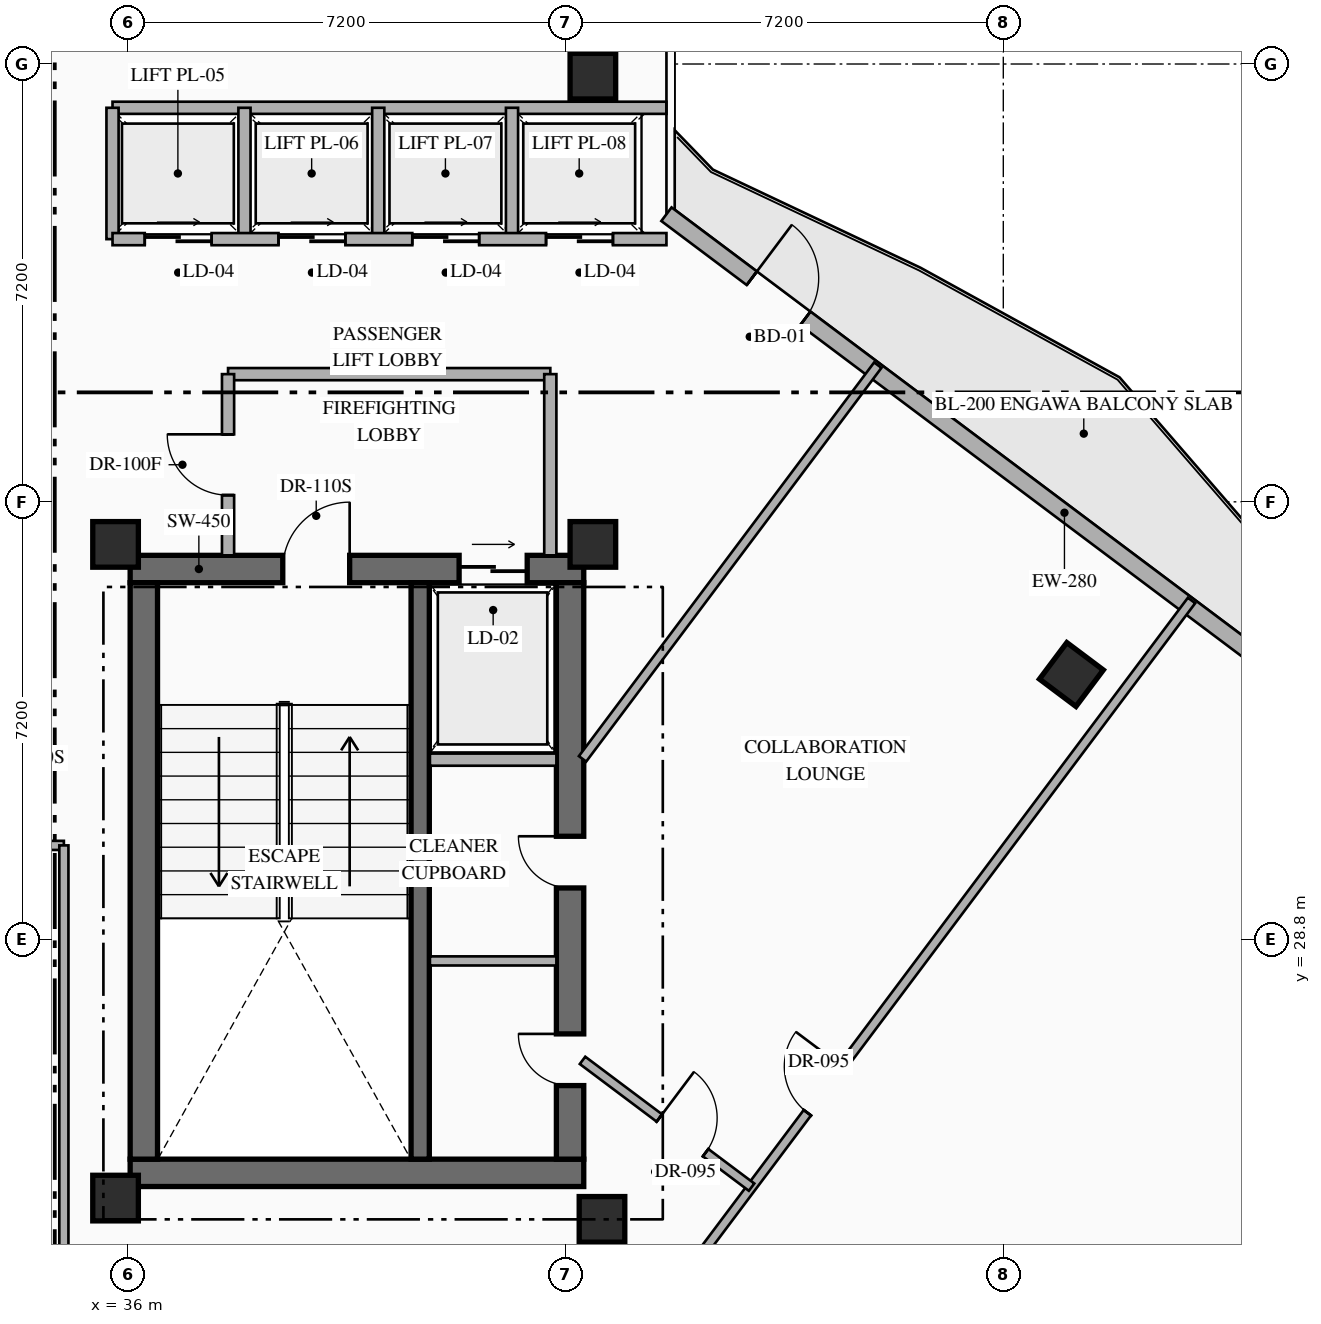
"""IFC4 building model, lengths in metres.
Left out: names, types, materials, properties, quantities, classifications, styles, units other than length and angle.
Written with IfcOpenShell. Run it as: python <this file> out.ifc"""

import sys

from ifc_helpers import new_model, si_unit, direction, frame, frame_2d, origin, origin_2d, place, context, subcontext, project, spatial, rectangle, hollow_rectangle, extrude, element, fill, save


model = new_model("IFC4")
c1 = context("Model", 3, precision=1e-05, world=origin(), true_north=direction((0.0, 1.0)))
c2 = subcontext(c1, "Body", "Model", "MODEL_VIEW")
j1 = project(units=[si_unit("LENGTHUNIT", "METRE"), si_unit("PLANEANGLEUNIT", "RADIAN")], contexts=[c1])
p1 = place(None, origin())
s1 = spatial("IfcSite", under=j1, at=p1, CompositionType="ELEMENT")
p2 = place(p1, origin())
s2 = spatial("IfcBuilding", under=s1, at=p2, CompositionType="ELEMENT")
p3 = place(p2, frame((0.0, 0.0, 191.55)))
s3 = spatial("IfcBuildingStorey", under=s2, at=p3, CompositionType="ELEMENT", Elevation=191.55)
p4 = place(p3, frame((36.04, 24.965, 0.0), z_axis=(0.0, 0.0, 1.0), x_axis=(1.0, 0.0, 0.0)))
e1 = element("IfcWall", 1, at=p4, inside=s3, PredefinedType="SHEAR", context=c2, shape_type="SweptSolid", body=[
    extrude(rectangle(XDim=7.46, YDim=0.45, at=frame_2d((3.73, 0.0))), origin(), (0.0, 0.0, 1.0), 3.6),
])
p5 = place(p3, frame((36.04, 34.895, 0.0), z_axis=(0.0, 0.0, 1.0), x_axis=(1.0, 0.0, 0.0)))
e2 = element("IfcWall", 2, at=p5, inside=s3, PredefinedType="SHEAR", context=c2, shape_type="SweptSolid", body=[
    extrude(rectangle(XDim=7.46, YDim=0.45, at=frame_2d((3.73, 0.0))), origin(), (0.0, 0.0, 1.0), 3.6),
])
p6 = place(p5, frame((2.51, 0.0, 0.0)))
e3 = element("IfcOpeningElement", 3, at=p6, cuts=e2, PredefinedType="OPENING", context=c2, shape_type="SweptSolid", body=[
    extrude(rectangle(XDim=1.1, YDim=2.2, at=frame_2d((0.55, 1.1))), frame((0.0, 0.235, 0.0), z_axis=(0.0, -1.0, 0.0), x_axis=(1.0, 0.0, 0.0)), (0.0, 0.0, 1.0), 0.47),
])
p7 = place(p5, frame((5.41, 0.0, 0.0)))
e4 = element("IfcOpeningElement", 4, at=p7, cuts=e2, PredefinedType="OPENING", context=c2, shape_type="SweptSolid", body=[
    extrude(rectangle(XDim=1.12, YDim=2.15, at=frame_2d((0.56, 1.075))), frame((0.0, 0.235, 0.0), z_axis=(0.0, -1.0, 0.0), x_axis=(1.0, 0.0, 0.0)), (0.0, 0.0, 1.0), 0.47),
])
p8 = place(p3, frame((36.265, 25.19, 0.0), z_axis=(0.0, 0.0, 1.0), x_axis=(0.0, 1.0, 0.0)))
e5 = element("IfcWall", 5, at=p8, inside=s3, PredefinedType="SHEAR", context=c2, shape_type="SweptSolid", body=[
    extrude(rectangle(XDim=9.48, YDim=0.45, at=frame_2d((4.74, 0.0))), origin(), (0.0, 0.0, 1.0), 3.6),
])
p9 = place(p3, frame((43.275, 25.19, 0.0), z_axis=(0.0, 0.0, 1.0), x_axis=(0.0, 1.0, 0.0)))
e6 = element("IfcWall", 6, at=p9, inside=s3, PredefinedType="SHEAR", context=c2, shape_type="SweptSolid", body=[
    extrude(rectangle(XDim=9.48, YDim=0.45, at=frame_2d((4.74, 0.0))), origin(), (0.0, 0.0, 1.0), 3.6),
])
p10 = place(p9, frame((1.21, 0.0, 0.0)))
e7 = element("IfcOpeningElement", 7, at=p10, cuts=e6, PredefinedType="OPENING", context=c2, shape_type="SweptSolid", body=[
    extrude(rectangle(XDim=0.85, YDim=2.08, at=frame_2d((0.425, 1.04))), frame((0.0, 0.235, 0.0), z_axis=(0.0, -1.0, 0.0), x_axis=(1.0, 0.0, 0.0)), (0.0, 0.0, 1.0), 0.47),
])
p11 = place(p9, frame((4.46, 0.0, 0.0)))
e8 = element("IfcOpeningElement", 8, at=p11, cuts=e6, PredefinedType="OPENING", context=c2, shape_type="SweptSolid", body=[
    extrude(rectangle(XDim=0.85, YDim=2.08, at=frame_2d((0.425, 1.04))), frame((0.0, 0.235, 0.0), z_axis=(0.0, -1.0, 0.0), x_axis=(1.0, 0.0, 0.0)), (0.0, 0.0, 1.0), 0.47),
])
p12 = place(p3, frame((40.81, 25.19, 0.0), z_axis=(0.0, 0.0, 1.0), x_axis=(0.0, 1.0, 0.0)))
e9 = element("IfcWall", 9, at=p12, inside=s3, PredefinedType="SHEAR", context=c2, shape_type="SweptSolid", body=[
    extrude(rectangle(XDim=9.48, YDim=0.3, at=frame_2d((4.74, 0.0))), origin(), (0.0, 0.0, 1.0), 3.6),
])
for number, where, z_axis, x_axis in (
    (10, (35.8, 24.55, 0.0), (0.0, 0.0, 1.0), (1.0, 0.0, 0.0)),
    (11, (43.8, 24.2, 0.0), (0.0, 0.0, 1.0), (1.0, 0.0, 0.0)),
    (12, (35.8, 35.3, 0.0), (0.0, 0.0, 1.0), (1.0, 0.0, 0.0)),
    (13, (43.65, 35.3, 0.0), (0.0, 0.0, 1.0), (1.0, 0.0, 0.0)),
    (14, (43.65, 43.0, 0.0), (0.0, 0.0, 1.0), (1.0, 0.0, 0.0)),
    (15, (51.52, 33.16, 0.0), (0.0, 0.0, 1.0), (0.8, -0.6, 0.0)),
):
    element("IfcColumn", number, at=place(p3, frame(where, z_axis=z_axis, x_axis=x_axis)), inside=s3, PredefinedType="COLUMN", context=c2, shape_type="SweptSolid", body=[
        extrude(hollow_rectangle(XDim=0.75, YDim=0.75, WallThickness=0.028, at=origin_2d()), origin(), (0.0, 0.0, 1.0), 3.6),
    ])
p13 = place(p3, frame((44.86, 40.73, 0.0), z_axis=(0.0, 0.0, 1.0), x_axis=(0.800007624502, -0.599989833863, 0.0)))
e16 = element("IfcWall", 16, at=p13, inside=s3, PredefinedType="STANDARD", context=c2, shape_type="SweptSolid", body=[
    extrude(rectangle(XDim=19.212, YDim=0.28, at=frame_2d((9.606, 0.0))), origin(), (0.0, 0.0, 1.0), 3.35),
])
p14 = place(p13, frame((1.755, 0.0, 0.0)))
e17 = element("IfcOpeningElement", 17, at=p14, cuts=e16, PredefinedType="OPENING", context=c2, shape_type="SweptSolid", body=[
    extrude(rectangle(XDim=1.1, YDim=2.2, at=frame_2d((0.55, 1.1))), frame((0.0, 0.15, 0.0), z_axis=(0.0, -1.0, 0.0), x_axis=(1.0, 0.0, 0.0)), (0.0, 0.0, 1.0), 0.3),
])
p15 = place(p13, frame((13.509, 0.0, 0.85)))
e18 = element("IfcOpeningElement", 18, at=p15, cuts=e16, PredefinedType="OPENING", context=c2, shape_type="SweptSolid", body=[
    extrude(rectangle(XDim=1.8, YDim=2.1, at=frame_2d((0.9, 1.05))), frame((0.0, 0.15, 0.0), z_axis=(0.0, -1.0, 0.0), x_axis=(1.0, 0.0, 0.0)), (0.0, 0.0, 1.0), 0.3),
])
p16 = place(p3, frame((40.97, 31.76, 0.0), z_axis=(0.0, 0.0, 1.0), x_axis=(1.0, 0.0, 0.0)))
e19 = element("IfcWall", 19, at=p16, inside=s3, PredefinedType="STANDARD", context=c2, shape_type="SweptSolid", body=[
    extrude(rectangle(XDim=2.08, YDim=0.2, at=frame_2d((1.04, 0.0))), origin(), (0.0, 0.0, 1.0), 3.35),
])
p17 = place(p3, frame((40.97, 28.45, 0.0), z_axis=(0.0, 0.0, 1.0), x_axis=(1.0, 0.0, 0.0)))
e20 = element("IfcWall", 20, at=p17, inside=s3, PredefinedType="PARTITIONING", context=c2, shape_type="SweptSolid", body=[
    extrude(rectangle(XDim=2.08, YDim=0.15, at=frame_2d((1.04, 0.0))), origin(), (0.0, 0.0, 1.0), 3.35),
])
p18 = place(p3, frame((37.65, 38.1, 0.0), z_axis=(0.0, 0.0, 1.0), x_axis=(1.0, 0.0, 0.0)))
e21 = element("IfcWall", 21, at=p18, inside=s3, PredefinedType="STANDARD", context=c2, shape_type="SweptSolid", body=[
    extrude(rectangle(XDim=5.3, YDim=0.2, at=frame_2d((2.65, 0.0))), origin(), (0.0, 0.0, 1.0), 3.35),
])
p19 = place(p3, frame((42.95, 35.12, 0.0), z_axis=(0.0, 0.0, 1.0), x_axis=(0.0, 1.0, 0.0)))
e22 = element("IfcWall", 22, at=p19, inside=s3, PredefinedType="STANDARD", context=c2, shape_type="SweptSolid", body=[
    extrude(rectangle(XDim=2.98, YDim=0.2, at=frame_2d((1.49, 0.0))), origin(), (0.0, 0.0, 1.0), 3.35),
])
p20 = place(p3, frame((37.65, 35.12, 0.0), z_axis=(0.0, 0.0, 1.0), x_axis=(0.0, 1.0, 0.0)))
e23 = element("IfcWall", 23, at=p20, inside=s3, PredefinedType="STANDARD", context=c2, shape_type="SweptSolid", body=[
    extrude(rectangle(XDim=2.98, YDim=0.2, at=frame_2d((1.49, 0.0))), origin(), (0.0, 0.0, 1.0), 3.35),
])
p21 = place(p20, frame((0.99, 0.0, 0.0)))
e24 = element("IfcOpeningElement", 24, at=p21, cuts=e23, PredefinedType="OPENING", context=c2, shape_type="SweptSolid", body=[
    extrude(rectangle(XDim=1.0, YDim=2.2, at=frame_2d((0.5, 1.1))), frame((0.0, 0.11, 0.0), z_axis=(0.0, -1.0, 0.0), x_axis=(1.0, 0.0, 0.0)), (0.0, 0.0, 1.0), 0.22),
])
p22 = place(p3, frame((35.75, 42.48, 0.0), z_axis=(0.0, 0.0, 1.0), x_axis=(1.0, 0.0, 0.0)))
e25 = element("IfcWall", 25, at=p22, inside=s3, PredefinedType="STANDARD", context=c2, shape_type="SweptSolid", body=[
    extrude(rectangle(XDim=9.11, YDim=0.2, at=frame_2d((4.555, 0.0))), origin(), (0.0, 0.0, 1.0), 3.35),
])
for number, where, z_axis, x_axis in (
    (26, (35.75, 40.32, 0.0), (0.0, 0.0, 1.0), (0.0, 1.0, 0.0)),
    (27, (37.92, 40.32, 0.0), (0.0, 0.0, 1.0), (0.0, 1.0, 0.0)),
    (28, (40.12, 40.32, 0.0), (0.0, 0.0, 1.0), (0.0, 1.0, 0.0)),
    (29, (42.32, 40.32, 0.0), (0.0, 0.0, 1.0), (0.0, 1.0, 0.0)),
):
    element("IfcWall", number, at=place(p3, frame(where, z_axis=z_axis, x_axis=x_axis)), inside=s3, PredefinedType="STANDARD", context=c2, shape_type="SweptSolid", body=[
        extrude(rectangle(XDim=2.16, YDim=0.2, at=frame_2d((1.08, 0.0))), origin(), (0.0, 0.0, 1.0), 3.35),
    ])
p23 = place(p3, frame((35.75, 40.32, 0.0), z_axis=(0.0, 0.0, 1.0), x_axis=(1.0, 0.0, 0.0)))
e30 = element("IfcWall", 30, at=p23, inside=s3, PredefinedType="STANDARD", context=c2, shape_type="SweptSolid", body=[
    extrude(rectangle(XDim=9.11, YDim=0.2, at=frame_2d((4.555, 0.0))), origin(), (0.0, 0.0, 1.0), 3.35),
])
p24 = place(p23, frame((0.53, 0.0, 0.0)))
e31 = element("IfcOpeningElement", 31, at=p24, cuts=e30, PredefinedType="OPENING", context=c2, shape_type="SweptSolid", body=[
    extrude(rectangle(XDim=1.1, YDim=2.18, at=frame_2d((0.55, 1.09))), frame((0.0, 0.11, 0.0), z_axis=(0.0, -1.0, 0.0), x_axis=(1.0, 0.0, 0.0)), (0.0, 0.0, 1.0), 0.22),
])
p25 = place(p23, frame((2.73, 0.0, 0.0)))
e32 = element("IfcOpeningElement", 32, at=p25, cuts=e30, PredefinedType="OPENING", context=c2, shape_type="SweptSolid", body=[
    extrude(rectangle(XDim=1.1, YDim=2.18, at=frame_2d((0.55, 1.09))), frame((0.0, 0.11, 0.0), z_axis=(0.0, -1.0, 0.0), x_axis=(1.0, 0.0, 0.0)), (0.0, 0.0, 1.0), 0.22),
])
p26 = place(p23, frame((4.93, 0.0, 0.0)))
e33 = element("IfcOpeningElement", 33, at=p26, cuts=e30, PredefinedType="OPENING", context=c2, shape_type="SweptSolid", body=[
    extrude(rectangle(XDim=1.1, YDim=2.18, at=frame_2d((0.55, 1.09))), frame((0.0, 0.11, 0.0), z_axis=(0.0, -1.0, 0.0), x_axis=(1.0, 0.0, 0.0)), (0.0, 0.0, 1.0), 0.22),
])
p27 = place(p23, frame((7.13, 0.0, 0.0)))
e34 = element("IfcOpeningElement", 34, at=p27, cuts=e30, PredefinedType="OPENING", context=c2, shape_type="SweptSolid", body=[
    extrude(rectangle(XDim=1.1, YDim=2.18, at=frame_2d((0.55, 1.09))), frame((0.0, 0.11, 0.0), z_axis=(0.0, -1.0, 0.0), x_axis=(1.0, 0.0, 0.0)), (0.0, 0.0, 1.0), 0.22),
])
p28 = place(p3, frame((25.55, 30.35, 0.0), z_axis=(0.0, 0.0, 1.0), x_axis=(1.0, 0.0, 0.0)))
e35 = element("IfcWall", 35, at=p28, inside=s3, PredefinedType="PARTITIONING", context=c2, shape_type="SweptSolid", body=[
    extrude(rectangle(XDim=9.4, YDim=0.15, at=frame_2d((4.7, 0.0))), origin(), (0.0, 0.0, 1.0), 3.35),
])
p29 = place(p28, frame((7.638, 0.0, 0.0)))
e36 = element("IfcOpeningElement", 36, at=p29, cuts=e35, PredefinedType="OPENING", context=c2, shape_type="SweptSolid", body=[
    extrude(rectangle(XDim=1.0, YDim=2.15, at=frame_2d((0.5, 1.075))), frame((0.0, 0.085, 0.0), z_axis=(0.0, -1.0, 0.0), x_axis=(1.0, 0.0, 0.0)), (0.0, 0.0, 1.0), 0.17),
])
p30 = place(p3, frame((34.95, 23.2, 0.0), z_axis=(0.0, 0.0, 1.0), x_axis=(0.0, 1.0, 0.0)))
e37 = element("IfcWall", 37, at=p30, inside=s3, PredefinedType="PARTITIONING", context=c2, shape_type="SweptSolid", body=[
    extrude(rectangle(XDim=7.15, YDim=0.15, at=frame_2d((3.575, 0.0))), origin(), (0.0, 0.0, 1.0), 3.35),
])
p31 = place(p3, frame((41.43, 18.29, 0.0), z_axis=(0.0, 0.0, 1.0), x_axis=(0.600007769734, 0.79999417264, 0.0)))
e38 = element("IfcWall", 38, at=p31, inside=s3, PredefinedType="PARTITIONING", context=c2, shape_type="SweptSolid", body=[
    extrude(rectangle(XDim=20.11, YDim=0.15, at=frame_2d((10.055, 0.0))), origin(), (0.0, 0.0, 1.0), 3.35),
])
p32 = place(p31, frame((9.58, 0.0, 0.0)))
e39 = element("IfcOpeningElement", 39, at=p32, cuts=e38, PredefinedType="OPENING", context=c2, shape_type="SweptSolid", body=[
    extrude(rectangle(XDim=0.95, YDim=2.15, at=frame_2d((0.475, 1.075))), frame((0.0, 0.085, 0.0), z_axis=(0.0, -1.0, 0.0), x_axis=(1.0, 0.0, 0.0)), (0.0, 0.0, 1.0), 0.17),
])
p33 = place(p3, frame((43.48, 26.815, 0.0), z_axis=(0.0, 0.0, 1.0), x_axis=(0.800008430676, -0.599988758934, 0.0)))
e40 = element("IfcWall", 40, at=p33, inside=s3, PredefinedType="PARTITIONING", context=c2, shape_type="SweptSolid", body=[
    extrude(rectangle(XDim=3.475, YDim=0.15, at=frame_2d((1.738, 0.0))), origin(), (0.0, 0.0, 1.0), 3.35),
])
p34 = place(p33, frame((1.58, 0.0, 0.0)))
e41 = element("IfcOpeningElement", 41, at=p34, cuts=e40, PredefinedType="OPENING", context=c2, shape_type="SweptSolid", body=[
    extrude(rectangle(XDim=0.95, YDim=2.15, at=frame_2d((0.475, 1.075))), frame((0.0, 0.085, 0.0), z_axis=(0.0, -1.0, 0.0), x_axis=(1.0, 0.0, 0.0)), (0.0, 0.0, 1.0), 0.17),
])
p35 = place(p3, frame((43.48, 31.773, 0.0), z_axis=(0.0, 0.0, 1.0), x_axis=(0.599971041729, 0.800021717885, 0.0)))
e42 = element("IfcWall", 42, at=p35, inside=s3, PredefinedType="PARTITIONING", context=c2, shape_type="SweptSolid", body=[
    extrude(rectangle(XDim=8.094, YDim=0.15, at=frame_2d((4.047, 0.0))), origin(), (0.0, 0.0, 1.0), 3.35),
])
p36 = place(p3, frame((27.91, 26.68, 0.0), z_axis=(0.0, 0.0, 1.0), x_axis=(0.800005938517, -0.599992081896, 0.0)))
e43 = element("IfcWall", 43, at=p36, inside=s3, PredefinedType="PARTITIONING", context=c2, shape_type="SweptSolid", body=[
    extrude(rectangle(XDim=14.8, YDim=0.15, at=frame_2d((7.4, 0.0))), origin(), (0.0, 0.0, 1.0), 3.35),
])
p37 = place(p36, frame((9.281, 0.0, 0.0)))
e44 = element("IfcOpeningElement", 44, at=p37, cuts=e43, PredefinedType="OPENING", context=c2, shape_type="SweptSolid", body=[
    extrude(rectangle(XDim=0.95, YDim=2.15, at=frame_2d((0.475, 1.075))), frame((0.0, 0.085, 0.0), z_axis=(0.0, -1.0, 0.0), x_axis=(1.0, 0.0, 0.0)), (0.0, 0.0, 1.0), 0.17),
])
p38 = place(p14, origin())
e45 = element("IfcDoor", 45, at=p38, inside=s3, OperationType="SINGLE_SWING_LEFT", PredefinedType="DOOR", context=c2, shape_type="SweptSolid", body=[
    extrude(rectangle(XDim=1.1, YDim=2.2, at=frame_2d((0.55, 1.1))), frame((0.0, 0.025, 0.0), z_axis=(0.0, -1.0, 0.0), x_axis=(1.0, 0.0, 0.0)), (0.0, 0.0, 1.0), 0.05),
])
fill(e17, e45)
p39 = place(p6, origin())
e46 = element("IfcDoor", 46, at=p39, inside=s3, OperationType="SINGLE_SWING_RIGHT", PredefinedType="DOOR", context=c2, shape_type="SweptSolid", body=[
    extrude(rectangle(XDim=1.1, YDim=2.2, at=frame_2d((0.55, 1.1))), frame((0.0, 0.025, 0.0), z_axis=(0.0, -1.0, 0.0), x_axis=(1.0, 0.0, 0.0)), (0.0, 0.0, 1.0), 0.05),
])
fill(e3, e46)
p40 = place(p7, origin())
e47 = element("IfcDoor", 47, at=p40, inside=s3, OperationType="SLIDING_TO_RIGHT", PredefinedType="USERDEFINED", context=c2, shape_type="SweptSolid", body=[
    extrude(rectangle(XDim=1.12, YDim=2.15, at=frame_2d((0.56, 1.075))), frame((0.0, 0.025, 0.0), z_axis=(0.0, -1.0, 0.0), x_axis=(1.0, 0.0, 0.0)), (0.0, 0.0, 1.0), 0.05),
])
fill(e4, e47)
p41 = place(p10, origin())
e48 = element("IfcDoor", 48, at=p41, inside=s3, OperationType="SINGLE_SWING_RIGHT", PredefinedType="DOOR", context=c2, shape_type="SweptSolid", body=[
    extrude(rectangle(XDim=0.85, YDim=2.08, at=frame_2d((0.425, 1.04))), frame((0.0, 0.025, 0.0), z_axis=(0.0, -1.0, 0.0), x_axis=(1.0, 0.0, 0.0)), (0.0, 0.0, 1.0), 0.05),
])
fill(e7, e48)
p42 = place(p11, origin())
e49 = element("IfcDoor", 49, at=p42, inside=s3, OperationType="SINGLE_SWING_RIGHT", PredefinedType="DOOR", context=c2, shape_type="SweptSolid", body=[
    extrude(rectangle(XDim=0.85, YDim=2.08, at=frame_2d((0.425, 1.04))), frame((0.0, 0.025, 0.0), z_axis=(0.0, -1.0, 0.0), x_axis=(1.0, 0.0, 0.0)), (0.0, 0.0, 1.0), 0.05),
])
fill(e8, e49)
p43 = place(p21, origin())
e50 = element("IfcDoor", 50, at=p43, inside=s3, OperationType="SINGLE_SWING_RIGHT", PredefinedType="DOOR", context=c2, shape_type="SweptSolid", body=[
    extrude(rectangle(XDim=1.0, YDim=2.2, at=frame_2d((0.5, 1.1))), frame((0.0, 0.025, 0.0), z_axis=(0.0, -1.0, 0.0), x_axis=(1.0, 0.0, 0.0)), (0.0, 0.0, 1.0), 0.05),
])
fill(e24, e50)
p44 = place(p24, origin())
e51 = element("IfcDoor", 51, at=p44, inside=s3, OperationType="SLIDING_TO_RIGHT", PredefinedType="USERDEFINED", context=c2, shape_type="SweptSolid", body=[
    extrude(rectangle(XDim=1.1, YDim=2.18, at=frame_2d((0.55, 1.09))), frame((0.0, 0.025, 0.0), z_axis=(0.0, -1.0, 0.0), x_axis=(1.0, 0.0, 0.0)), (0.0, 0.0, 1.0), 0.05),
])
fill(e31, e51)
p45 = place(p25, origin())
e52 = element("IfcDoor", 52, at=p45, inside=s3, OperationType="SLIDING_TO_RIGHT", PredefinedType="USERDEFINED", context=c2, shape_type="SweptSolid", body=[
    extrude(rectangle(XDim=1.1, YDim=2.18, at=frame_2d((0.55, 1.09))), frame((0.0, 0.025, 0.0), z_axis=(0.0, -1.0, 0.0), x_axis=(1.0, 0.0, 0.0)), (0.0, 0.0, 1.0), 0.05),
])
fill(e32, e52)
p46 = place(p26, origin())
e53 = element("IfcDoor", 53, at=p46, inside=s3, OperationType="SLIDING_TO_RIGHT", PredefinedType="USERDEFINED", context=c2, shape_type="SweptSolid", body=[
    extrude(rectangle(XDim=1.1, YDim=2.18, at=frame_2d((0.55, 1.09))), frame((0.0, 0.025, 0.0), z_axis=(0.0, -1.0, 0.0), x_axis=(1.0, 0.0, 0.0)), (0.0, 0.0, 1.0), 0.05),
])
fill(e33, e53)
p47 = place(p27, origin())
e54 = element("IfcDoor", 54, at=p47, inside=s3, OperationType="SLIDING_TO_RIGHT", PredefinedType="USERDEFINED", context=c2, shape_type="SweptSolid", body=[
    extrude(rectangle(XDim=1.1, YDim=2.18, at=frame_2d((0.55, 1.09))), frame((0.0, 0.025, 0.0), z_axis=(0.0, -1.0, 0.0), x_axis=(1.0, 0.0, 0.0)), (0.0, 0.0, 1.0), 0.05),
])
fill(e34, e54)
p48 = place(p32, origin())
e55 = element("IfcDoor", 55, at=p48, inside=s3, OperationType="SINGLE_SWING_RIGHT", PredefinedType="DOOR", context=c2, shape_type="SweptSolid", body=[
    extrude(rectangle(XDim=0.95, YDim=2.15, at=frame_2d((0.475, 1.075))), frame((0.0, 0.025, 0.0), z_axis=(0.0, -1.0, 0.0), x_axis=(1.0, 0.0, 0.0)), (0.0, 0.0, 1.0), 0.05),
])
fill(e39, e55)
p49 = place(p34, origin())
e56 = element("IfcDoor", 56, at=p49, inside=s3, OperationType="SINGLE_SWING_LEFT", PredefinedType="DOOR", context=c2, shape_type="SweptSolid", body=[
    extrude(rectangle(XDim=0.95, YDim=2.15, at=frame_2d((0.475, 1.075))), frame((0.0, 0.025, 0.0), z_axis=(0.0, -1.0, 0.0), x_axis=(1.0, 0.0, 0.0)), (0.0, 0.0, 1.0), 0.05),
])
fill(e41, e56)
save(model, sys.argv[1])
